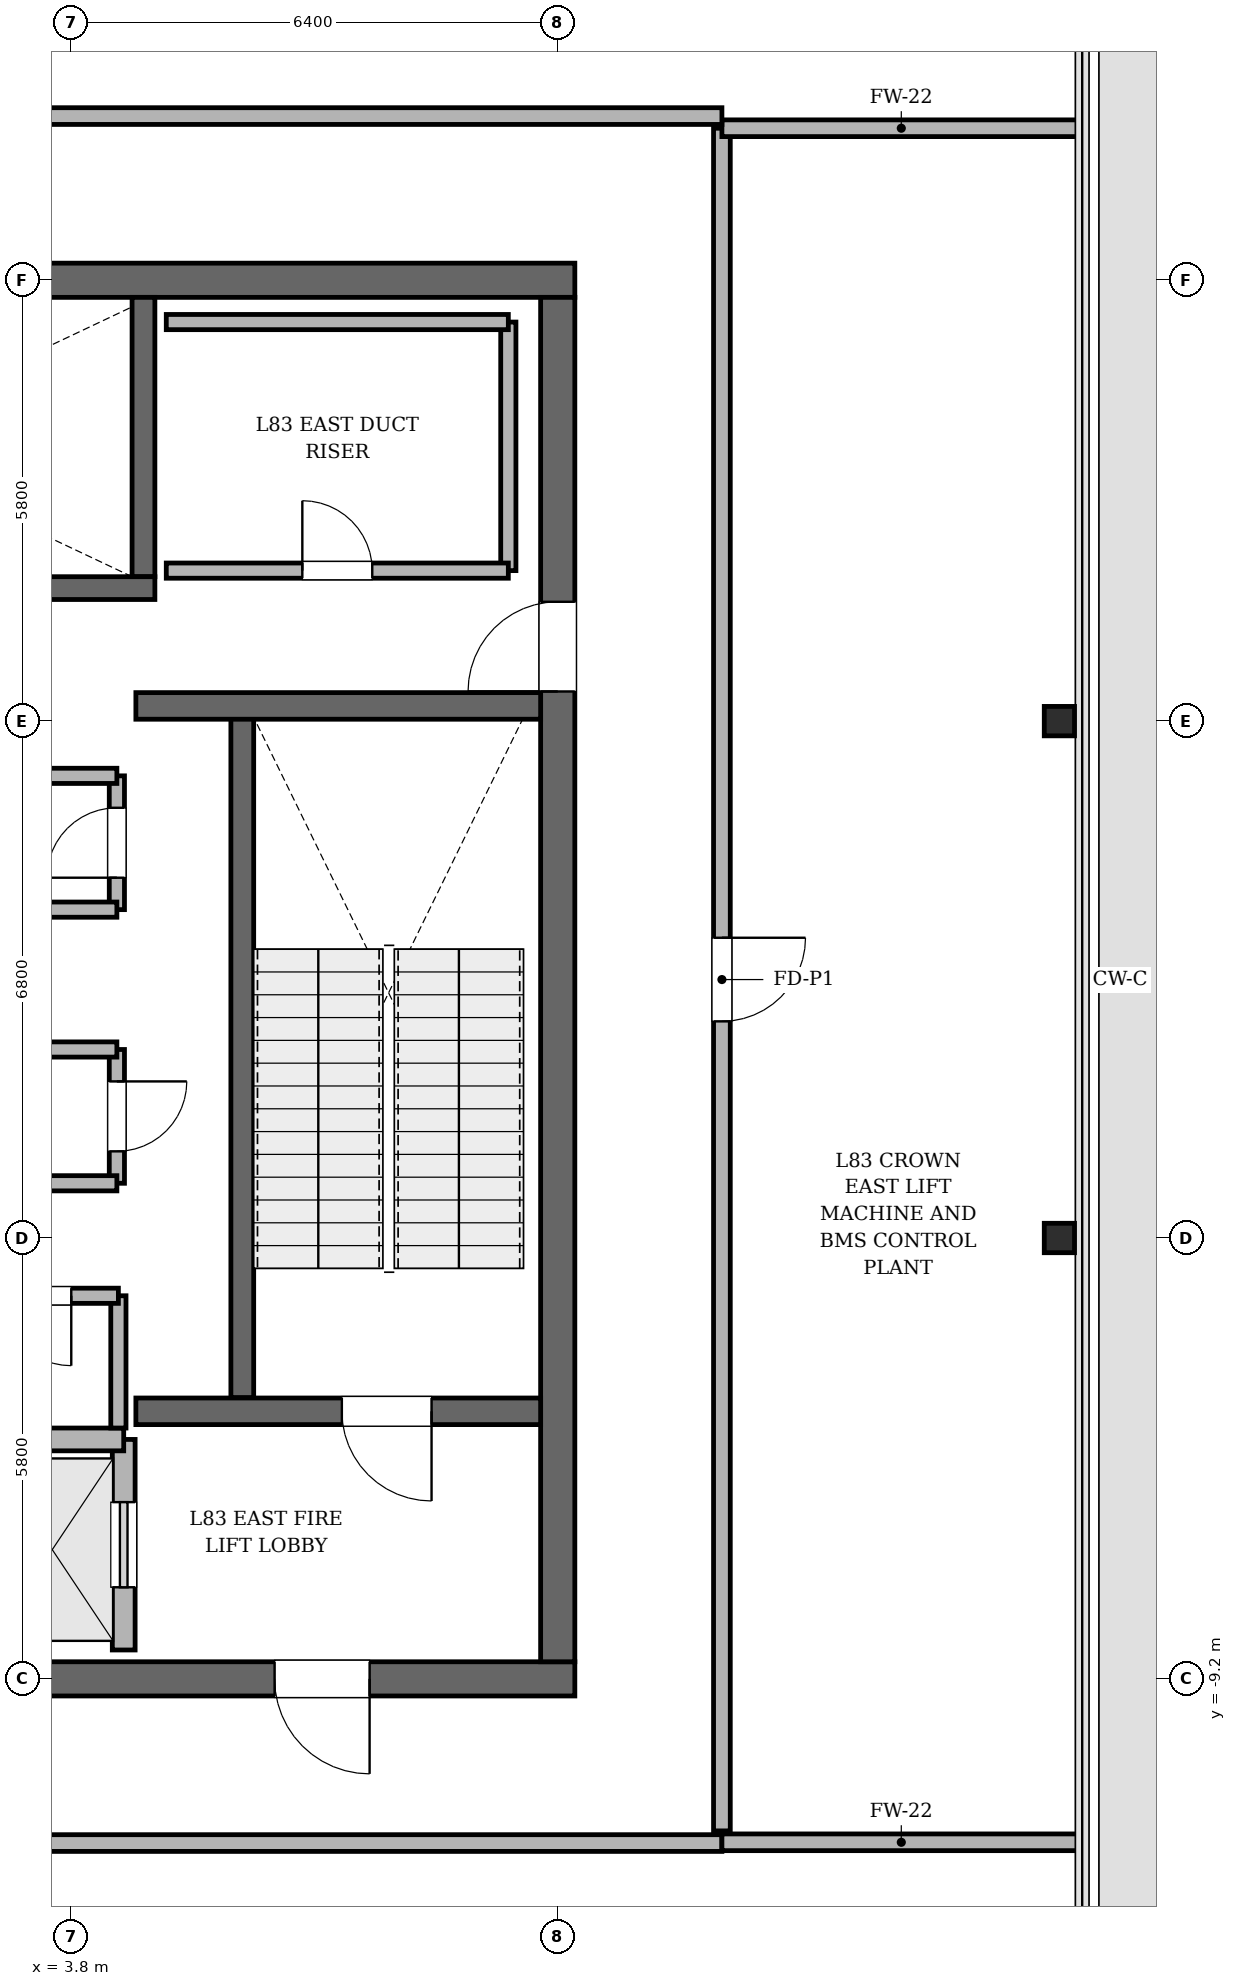
"""IFC4 building model, lengths in metres.
Left out: names, types, materials, properties, quantities, classifications, styles, units other than length and angle.
Written with IfcOpenShell. Run it as: python <this file> out.ifc"""

import sys

from ifc_helpers import new_model, si_unit, direction, frame, frame_2d, origin, origin_2d, place, context, subcontext, project, spatial, rectangle, i_section, extrude, element, fill, save


model = new_model("IFC4")
c1 = context("Model", 3, precision=1e-05, world=origin(), true_north=direction((0.0, 1.0)))
c2 = subcontext(c1, "Body", "Model", "MODEL_VIEW")
j1 = project(units=[si_unit("LENGTHUNIT", "METRE"), si_unit("PLANEANGLEUNIT", "RADIAN")], contexts=[c1])
p1 = place(None, origin())
s1 = spatial("IfcSite", under=j1, at=p1, CompositionType="ELEMENT")
p2 = place(p1, origin())
s2 = spatial("IfcBuilding", under=s1, at=p2, CompositionType="ELEMENT")
p3 = place(p2, frame((0.0, 0.0, 352.8)))
s3 = spatial("IfcBuildingStorey", under=s2, at=p3, CompositionType="ELEMENT", Elevation=352.8)
p4 = place(p3, frame((10.425, -9.2, 0.0), z_axis=(0.0, 0.0, 1.0), x_axis=(-1.0, 0.0, 0.0)))
e1 = element("IfcWall", 1, at=p4, inside=s3, PredefinedType="SHEAR", context=c2, shape_type="SweptSolid", body=[
    extrude(rectangle(XDim=20.85, YDim=0.45, at=frame_2d((10.425, 0.0))), origin(), (0.0, 0.0, 1.0), 4.5),
])
p5 = place(p4, frame((2.7, 0.0, 0.0)))
e2 = element("IfcOpeningElement", 2, at=p5, cuts=e1, PredefinedType="OPENING", context=c2, shape_type="SweptSolid", body=[
    extrude(rectangle(XDim=1.25, YDim=2.25, at=frame_2d((0.625, 1.125))), frame((0.0, 0.235, 0.0), z_axis=(0.0, -1.0, 0.0), x_axis=(1.0, 0.0, 0.0)), (0.0, 0.0, 1.0), 0.47),
])
p6 = place(p4, frame((16.9, 0.0, 0.0)))
e3 = element("IfcOpeningElement", 3, at=p6, cuts=e1, PredefinedType="OPENING", context=c2, shape_type="SweptSolid", body=[
    extrude(rectangle(XDim=1.25, YDim=2.25, at=frame_2d((0.625, 1.125))), frame((0.0, 0.235, 0.0), z_axis=(0.0, -1.0, 0.0), x_axis=(1.0, 0.0, 0.0)), (0.0, 0.0, 1.0), 0.47),
])
p7 = place(p3, frame((-10.425, 9.2, 0.0), z_axis=(0.0, 0.0, 1.0), x_axis=(1.0, 0.0, 0.0)))
e4 = element("IfcWall", 4, at=p7, inside=s3, PredefinedType="SHEAR", context=c2, shape_type="SweptSolid", body=[
    extrude(rectangle(XDim=20.85, YDim=0.45, at=frame_2d((10.425, 0.0))), origin(), (0.0, 0.0, 1.0), 4.5),
])
p8 = place(p3, frame((10.2, 8.975, 0.0), z_axis=(0.0, 0.0, 1.0), x_axis=(0.0, -1.0, 0.0)))
e5 = element("IfcWall", 5, at=p8, inside=s3, PredefinedType="SHEAR", context=c2, shape_type="SweptSolid", body=[
    extrude(rectangle(XDim=17.95, YDim=0.45, at=frame_2d((8.975, 0.0))), origin(), (0.0, 0.0, 1.0), 4.5),
])
p9 = place(p8, frame((4.005, 0.0, 0.0)))
e6 = element("IfcOpeningElement", 6, at=p9, cuts=e5, PredefinedType="OPENING", context=c2, shape_type="SweptSolid", body=[
    extrude(rectangle(XDim=1.18, YDim=2.2, at=frame_2d((0.59, 1.1))), frame((0.0, 0.235, 0.0), z_axis=(0.0, -1.0, 0.0), x_axis=(1.0, 0.0, 0.0)), (0.0, 0.0, 1.0), 0.47),
])
p10 = place(p3, frame((6.05, 3.45, 0.0), z_axis=(0.0, 0.0, 1.0), x_axis=(0.0, -1.0, 0.0)))
e7 = element("IfcWall", 7, at=p10, inside=s3, PredefinedType="SOLIDWALL", context=c2, shape_type="SweptSolid", body=[
    extrude(rectangle(XDim=8.95, YDim=0.3, at=frame_2d((4.475, 0.0))), origin(), (0.0, 0.0, 1.0), 4.5),
])
p11 = place(p3, frame((4.75, 8.975, 0.0), z_axis=(0.0, 0.0, 1.0), x_axis=(0.0, -1.0, 0.0)))
e8 = element("IfcWall", 8, at=p11, inside=s3, PredefinedType="SOLIDWALL", context=c2, shape_type="SweptSolid", body=[
    extrude(rectangle(XDim=3.675, YDim=0.3, at=frame_2d((1.837, 0.0))), origin(), (0.0, 0.0, 1.0), 4.5),
])
p12 = place(p3, frame((-4.9, 5.15, 0.0), z_axis=(0.0, 0.0, 1.0), x_axis=(1.0, 0.0, 0.0)))
e9 = element("IfcWall", 9, at=p12, inside=s3, PredefinedType="SOLIDWALL", context=c2, shape_type="SweptSolid", body=[
    extrude(rectangle(XDim=9.8, YDim=0.3, at=frame_2d((4.9, 0.0))), origin(), (0.0, 0.0, 1.0), 4.5),
])
p13 = place(p12, frame((0.56, 0.0, 0.0)))
e10 = element("IfcOpeningElement", 10, at=p13, cuts=e9, PredefinedType="OPENING", context=c2, shape_type="SweptSolid", body=[
    extrude(rectangle(XDim=1.18, YDim=2.2, at=frame_2d((0.59, 1.1))), frame((0.0, 0.16, 0.0), z_axis=(0.0, -1.0, 0.0), x_axis=(1.0, 0.0, 0.0)), (0.0, 0.0, 1.0), 0.32),
])
p14 = place(p3, frame((4.65, -5.68, 0.0), z_axis=(0.0, 0.0, 1.0), x_axis=(1.0, 0.0, 0.0)))
e11 = element("IfcWall", 11, at=p14, inside=s3, PredefinedType="SOLIDWALL", context=c2, shape_type="SweptSolid", body=[
    extrude(rectangle(XDim=5.325, YDim=0.35, at=frame_2d((2.663, 0.0))), origin(), (0.0, 0.0, 1.0), 4.5),
])
p15 = place(p14, frame((2.71, 0.0, 0.0)))
e12 = element("IfcOpeningElement", 12, at=p15, cuts=e11, PredefinedType="OPENING", context=c2, shape_type="SweptSolid", body=[
    extrude(rectangle(XDim=1.18, YDim=2.2, at=frame_2d((0.59, 1.1))), frame((0.0, 0.185, 0.0), z_axis=(0.0, -1.0, 0.0), x_axis=(1.0, 0.0, 0.0)), (0.0, 0.0, 1.0), 0.37),
])
p16 = place(p3, frame((4.65, 3.6, 0.0), z_axis=(0.0, 0.0, 1.0), x_axis=(1.0, 0.0, 0.0)))
e13 = element("IfcWall", 13, at=p16, inside=s3, PredefinedType="SOLIDWALL", context=c2, shape_type="SweptSolid", body=[
    extrude(rectangle(XDim=5.325, YDim=0.35, at=frame_2d((2.663, 0.0))), origin(), (0.0, 0.0, 1.0), 4.5),
])
for number, where, z_axis, x_axis in (
    (14, (16.8, -3.4, 0.0), (0.0, 0.0, 1.0), (1.0, 0.0, 0.0)),
    (15, (16.8, 3.4, 0.0), (0.0, 0.0, 1.0), (1.0, 0.0, 0.0)),
):
    element("IfcColumn", number, at=place(p3, frame(where, z_axis=z_axis, x_axis=x_axis)), inside=s3, PredefinedType="COLUMN", context=c2, shape_type="SweptSolid", body=[
        extrude(i_section(OverallWidth=0.398, OverallDepth=0.387, WebThickness=0.021, FlangeThickness=0.033, FilletRadius=0.018, at=origin_2d()), origin(), (0.0, 0.0, 1.0), 4.498),
    ])
p17 = place(p3, frame((4.49, -8.82, 0.0), z_axis=(0.0, 0.0, 1.0), x_axis=(0.0, 1.0, 0.0)))
e16 = element("IfcWall", 16, at=p17, inside=s3, PredefinedType="SOLIDWALL", context=c2, shape_type="SweptSolid", body=[
    extrude(rectangle(XDim=2.77, YDim=0.3, at=frame_2d((1.385, 0.0))), origin(), (0.0, 0.0, 1.0), 4.28),
])
p18 = place(p17, frame((0.825, 0.0, 0.0)))
e17 = element("IfcOpeningElement", 17, at=p18, cuts=e16, PredefinedType="OPENING", context=c2, shape_type="SweptSolid", body=[
    extrude(rectangle(XDim=1.12, YDim=2.25, at=frame_2d((0.56, 1.125))), frame((0.0, 0.16, 0.0), z_axis=(0.0, -1.0, 0.0), x_axis=(1.0, 0.0, 0.0)), (0.0, 0.0, 1.0), 0.32),
])
p19 = place(p3, frame((2.61, -6.05, 0.0), z_axis=(0.0, 0.0, 1.0), x_axis=(1.0, 0.0, 0.0)))
e18 = element("IfcWall", 18, at=p19, inside=s3, PredefinedType="SOLIDWALL", context=c2, shape_type="SweptSolid", body=[
    extrude(rectangle(XDim=1.88, YDim=0.3, at=frame_2d((0.94, 0.0))), origin(), (0.0, 0.0, 1.0), 4.28),
])
p20 = place(p3, frame((4.42, -5.9, 0.0), z_axis=(0.0, 0.0, 1.0), x_axis=(0.0, 1.0, 0.0)))
e19 = element("IfcWall", 19, at=p20, inside=s3, PredefinedType="SOLIDWALL", context=c2, shape_type="SweptSolid", body=[
    extrude(rectangle(XDim=1.74, YDim=0.2, at=frame_2d((0.87, 0.0))), origin(), (0.0, 0.0, 1.0), 4.28),
])
p21 = place(p3, frame((4.42, -4.16, 0.0), z_axis=(0.0, 0.0, 1.0), x_axis=(-1.0, 0.0, 0.0)))
e20 = element("IfcWall", 20, at=p21, inside=s3, PredefinedType="SOLIDWALL", context=c2, shape_type="SweptSolid", body=[
    extrude(rectangle(XDim=2.16, YDim=0.2, at=frame_2d((1.08, 0.0))), origin(), (0.0, 0.0, 1.0), 4.28),
])
p22 = place(p21, frame((0.62, 0.0, 0.0)))
e21 = element("IfcOpeningElement", 21, at=p22, cuts=e20, PredefinedType="OPENING", context=c2, shape_type="SweptSolid", body=[
    extrude(rectangle(XDim=0.92, YDim=2.1, at=frame_2d((0.46, 1.05))), frame((0.0, 0.11, 0.0), z_axis=(0.0, -1.0, 0.0), x_axis=(1.0, 0.0, 0.0)), (0.0, 0.0, 1.0), 0.22),
])
p23 = place(p3, frame((4.4, -2.68, 0.0), z_axis=(0.0, 0.0, 1.0), x_axis=(0.0, 1.0, 0.0)))
e22 = element("IfcWall", 22, at=p23, inside=s3, PredefinedType="SOLIDWALL", context=c2, shape_type="SweptSolid", body=[
    extrude(rectangle(XDim=1.76, YDim=0.2, at=frame_2d((0.88, 0.0))), origin(), (0.0, 0.0, 1.0), 4.28),
])
p24 = place(p23, frame((0.42, 0.0, 0.0)))
e23 = element("IfcOpeningElement", 23, at=p24, cuts=e22, PredefinedType="OPENING", context=c2, shape_type="SweptSolid", body=[
    extrude(rectangle(XDim=0.92, YDim=2.1, at=frame_2d((0.46, 1.05))), frame((0.0, 0.11, 0.0), z_axis=(0.0, -1.0, 0.0), x_axis=(1.0, 0.0, 0.0)), (0.0, 0.0, 1.0), 0.22),
])
for number, where, z_axis, x_axis in (
    (24, (4.4, -0.92, 0.0), (0.0, 0.0, 1.0), (-1.0, 0.0, 0.0)),
    (25, (-4.4, -2.68, 0.0), (0.0, 0.0, 1.0), (1.0, 0.0, 0.0)),
):
    element("IfcWall", number, at=place(p3, frame(where, z_axis=z_axis, x_axis=x_axis)), inside=s3, PredefinedType="SOLIDWALL", context=c2, shape_type="SweptSolid", body=[
        extrude(rectangle(XDim=8.8, YDim=0.2, at=frame_2d((4.4, 0.0))), origin(), (0.0, 0.0, 1.0), 4.28),
    ])
p25 = place(p3, frame((4.4, 0.92, 0.0), z_axis=(0.0, 0.0, 1.0), x_axis=(0.0, 1.0, 0.0)))
e26 = element("IfcWall", 26, at=p25, inside=s3, PredefinedType="SOLIDWALL", context=c2, shape_type="SweptSolid", body=[
    extrude(rectangle(XDim=1.76, YDim=0.2, at=frame_2d((0.88, 0.0))), origin(), (0.0, 0.0, 1.0), 4.28),
])
p26 = place(p25, frame((0.42, 0.0, 0.0)))
e27 = element("IfcOpeningElement", 27, at=p26, cuts=e26, PredefinedType="OPENING", context=c2, shape_type="SweptSolid", body=[
    extrude(rectangle(XDim=0.92, YDim=2.1, at=frame_2d((0.46, 1.05))), frame((0.0, 0.11, 0.0), z_axis=(0.0, -1.0, 0.0), x_axis=(1.0, 0.0, 0.0)), (0.0, 0.0, 1.0), 0.22),
])
for number, where, z_axis, x_axis in (
    (28, (4.4, 2.68, 0.0), (0.0, 0.0, 1.0), (-1.0, 0.0, 0.0)),
    (29, (-4.4, 0.92, 0.0), (0.0, 0.0, 1.0), (1.0, 0.0, 0.0)),
):
    element("IfcWall", number, at=place(p3, frame(where, z_axis=z_axis, x_axis=x_axis)), inside=s3, PredefinedType="SOLIDWALL", context=c2, shape_type="SweptSolid", body=[
        extrude(rectangle(XDim=8.8, YDim=0.2, at=frame_2d((4.4, 0.0))), origin(), (0.0, 0.0, 1.0), 4.28),
    ])
p27 = place(p3, frame((9.55, 5.38, 0.0), z_axis=(0.0, 0.0, 1.0), x_axis=(0.0, 1.0, 0.0)))
e30 = element("IfcWall", 30, at=p27, inside=s3, PredefinedType="SOLIDWALL", context=c2, shape_type="SweptSolid", body=[
    extrude(rectangle(XDim=3.27, YDim=0.2, at=frame_2d((1.635, 0.0))), origin(), (0.0, 0.0, 1.0), 4.28),
])
p28 = place(p3, frame((9.55, 8.65, 0.0), z_axis=(0.0, 0.0, 1.0), x_axis=(-1.0, 0.0, 0.0)))
e31 = element("IfcWall", 31, at=p28, inside=s3, PredefinedType="SOLIDWALL", context=c2, shape_type="SweptSolid", body=[
    extrude(rectangle(XDim=4.5, YDim=0.2, at=frame_2d((2.25, 0.0))), origin(), (0.0, 0.0, 1.0), 4.28),
])
p29 = place(p3, frame((5.05, 5.38, 0.0), z_axis=(0.0, 0.0, 1.0), x_axis=(1.0, 0.0, 0.0)))
e32 = element("IfcWall", 32, at=p29, inside=s3, PredefinedType="SOLIDWALL", context=c2, shape_type="SweptSolid", body=[
    extrude(rectangle(XDim=4.5, YDim=0.2, at=frame_2d((2.25, 0.0))), origin(), (0.0, 0.0, 1.0), 4.28),
])
p30 = place(p29, frame((1.79, 0.0, 0.0)))
e33 = element("IfcOpeningElement", 33, at=p30, cuts=e32, PredefinedType="OPENING", context=c2, shape_type="SweptSolid", body=[
    extrude(rectangle(XDim=0.92, YDim=2.1, at=frame_2d((0.46, 1.05))), frame((0.0, 0.11, 0.0), z_axis=(0.0, -1.0, 0.0), x_axis=(1.0, 0.0, 0.0)), (0.0, 0.0, 1.0), 0.22),
])
p31 = place(p3, frame((-12.36, -11.36, 0.0), z_axis=(0.0, 0.0, 1.0), x_axis=(1.0, 0.0, 0.0)))
e34 = element("IfcWall", 34, at=p31, inside=s3, PredefinedType="SOLIDWALL", context=c2, shape_type="SweptSolid", body=[
    extrude(rectangle(XDim=24.72, YDim=0.22, at=frame_2d((12.36, 0.0))), origin(), (0.0, 0.0, 1.0), 2.994),
])
p32 = place(p31, frame((11.81, 0.0, 0.0)))
e35 = element("IfcOpeningElement", 35, at=p32, cuts=e34, PredefinedType="OPENING", context=c2, shape_type="SweptSolid", body=[
    extrude(rectangle(XDim=1.1, YDim=2.2, at=frame_2d((0.55, 1.1))), frame((0.0, 0.12, 0.0), z_axis=(0.0, -1.0, 0.0), x_axis=(1.0, 0.0, 0.0)), (0.0, 0.0, 1.0), 0.24),
])
p33 = place(p3, frame((12.36, -11.35, 0.0), z_axis=(0.0, 0.0, 1.0), x_axis=(1.0, 0.0, 0.0)))
e36 = element("IfcWall", 36, at=p33, inside=s3, PredefinedType="SOLIDWALL", context=c2, shape_type="SweptSolid", body=[
    extrude(rectangle(XDim=4.72, YDim=0.22, at=frame_2d((2.36, 0.0))), origin(), (0.0, 0.0, 1.0), 2.994),
])
p34 = place(p3, frame((12.36, -11.2, 0.0), z_axis=(0.0, 0.0, 1.0), x_axis=(0.0, 1.0, 0.0)))
e37 = element("IfcWall", 37, at=p34, inside=s3, PredefinedType="SOLIDWALL", context=c2, shape_type="SweptSolid", body=[
    extrude(rectangle(XDim=22.4, YDim=0.22, at=frame_2d((11.2, 0.0))), origin(), (0.0, 0.0, 1.0), 2.994),
])
p35 = place(p34, frame((10.65, 0.0, 0.0)))
e38 = element("IfcOpeningElement", 38, at=p35, cuts=e37, PredefinedType="OPENING", context=c2, shape_type="SweptSolid", body=[
    extrude(rectangle(XDim=1.1, YDim=2.2, at=frame_2d((0.55, 1.1))), frame((0.0, 0.12, 0.0), z_axis=(0.0, -1.0, 0.0), x_axis=(1.0, 0.0, 0.0)), (0.0, 0.0, 1.0), 0.24),
])
p36 = place(p3, frame((12.36, 11.2, 0.0), z_axis=(0.0, 0.0, 1.0), x_axis=(1.0, 0.0, 0.0)))
e39 = element("IfcWall", 39, at=p36, inside=s3, PredefinedType="SOLIDWALL", context=c2, shape_type="SweptSolid", body=[
    extrude(rectangle(XDim=4.72, YDim=0.22, at=frame_2d((2.36, 0.0))), origin(), (0.0, 0.0, 1.0), 2.994),
])
p37 = place(p3, frame((12.36, 11.36, 0.0), z_axis=(0.0, 0.0, 1.0), x_axis=(-1.0, 0.0, 0.0)))
e40 = element("IfcWall", 40, at=p37, inside=s3, PredefinedType="SOLIDWALL", context=c2, shape_type="SweptSolid", body=[
    extrude(rectangle(XDim=24.72, YDim=0.22, at=frame_2d((12.36, 0.0))), origin(), (0.0, 0.0, 1.0), 2.994),
])
p38 = place(p37, frame((11.81, 0.0, 0.0)))
e41 = element("IfcOpeningElement", 41, at=p38, cuts=e40, PredefinedType="OPENING", context=c2, shape_type="SweptSolid", body=[
    extrude(rectangle(XDim=1.1, YDim=2.2, at=frame_2d((0.55, 1.1))), frame((0.0, 0.12, 0.0), z_axis=(0.0, -1.0, 0.0), x_axis=(1.0, 0.0, 0.0)), (0.0, 0.0, 1.0), 0.24),
])
p39 = place(p15, origin())
e42 = element("IfcDoor", 42, at=p39, inside=s3, OperationType="SINGLE_SWING_RIGHT", PredefinedType="DOOR", context=c2, shape_type="SweptSolid", body=[
    extrude(rectangle(XDim=1.18, YDim=2.2, at=frame_2d((0.59, 1.1))), frame((0.0, 0.025, 0.0), z_axis=(0.0, -1.0, 0.0), x_axis=(1.0, 0.0, 0.0)), (0.0, 0.0, 1.0), 0.05),
])
fill(e12, e42)
p40 = place(p5, origin())
e43 = element("IfcDoor", 43, at=p40, inside=s3, OperationType="SINGLE_SWING_LEFT", PredefinedType="DOOR", context=c2, shape_type="SweptSolid", body=[
    extrude(rectangle(XDim=1.25, YDim=2.25, at=frame_2d((0.625, 1.125))), frame((0.0, 0.025, 0.0), z_axis=(0.0, -1.0, 0.0), x_axis=(1.0, 0.0, 0.0)), (0.0, 0.0, 1.0), 0.05),
])
fill(e2, e43)
p41 = place(p9, origin())
e44 = element("IfcDoor", 44, at=p41, inside=s3, OperationType="SINGLE_SWING_RIGHT", PredefinedType="DOOR", context=c2, shape_type="SweptSolid", body=[
    extrude(rectangle(XDim=1.18, YDim=2.2, at=frame_2d((0.59, 1.1))), frame((0.0, 0.025, 0.0), z_axis=(0.0, -1.0, 0.0), x_axis=(1.0, 0.0, 0.0)), (0.0, 0.0, 1.0), 0.05),
])
fill(e6, e44)
p42 = place(p18, origin())
e45 = element("IfcDoor", 45, at=p42, inside=s3, OperationType="SLIDING_TO_RIGHT", PredefinedType="DOOR", context=c2, shape_type="SweptSolid", body=[
    extrude(rectangle(XDim=1.12, YDim=2.25, at=frame_2d((0.56, 1.125))), frame((0.0, 0.025, 0.0), z_axis=(0.0, -1.0, 0.0), x_axis=(1.0, 0.0, 0.0)), (0.0, 0.0, 1.0), 0.05),
])
fill(e17, e45)
p43 = place(p22, origin())
e46 = element("IfcDoor", 46, at=p43, inside=s3, OperationType="SINGLE_SWING_LEFT", PredefinedType="DOOR", context=c2, shape_type="SweptSolid", body=[
    extrude(rectangle(XDim=0.92, YDim=2.1, at=frame_2d((0.46, 1.05))), frame((0.0, 0.025, 0.0), z_axis=(0.0, -1.0, 0.0), x_axis=(1.0, 0.0, 0.0)), (0.0, 0.0, 1.0), 0.05),
])
fill(e21, e46)
p44 = place(p24, origin())
e47 = element("IfcDoor", 47, at=p44, inside=s3, OperationType="SINGLE_SWING_RIGHT", PredefinedType="DOOR", context=c2, shape_type="SweptSolid", body=[
    extrude(rectangle(XDim=0.92, YDim=2.1, at=frame_2d((0.46, 1.05))), frame((0.0, 0.025, 0.0), z_axis=(0.0, -1.0, 0.0), x_axis=(1.0, 0.0, 0.0)), (0.0, 0.0, 1.0), 0.05),
])
fill(e23, e47)
p45 = place(p26, origin())
e48 = element("IfcDoor", 48, at=p45, inside=s3, OperationType="SINGLE_SWING_LEFT", PredefinedType="DOOR", context=c2, shape_type="SweptSolid", body=[
    extrude(rectangle(XDim=0.92, YDim=2.1, at=frame_2d((0.46, 1.05))), frame((0.0, 0.025, 0.0), z_axis=(0.0, -1.0, 0.0), x_axis=(1.0, 0.0, 0.0)), (0.0, 0.0, 1.0), 0.05),
])
fill(e27, e48)
p46 = place(p30, origin())
e49 = element("IfcDoor", 49, at=p46, inside=s3, OperationType="SINGLE_SWING_LEFT", PredefinedType="DOOR", context=c2, shape_type="SweptSolid", body=[
    extrude(rectangle(XDim=0.92, YDim=2.1, at=frame_2d((0.46, 1.05))), frame((0.0, 0.025, 0.0), z_axis=(0.0, -1.0, 0.0), x_axis=(1.0, 0.0, 0.0)), (0.0, 0.0, 1.0), 0.05),
])
fill(e33, e49)
p47 = place(p35, origin())
e50 = element("IfcDoor", 50, at=p47, inside=s3, OperationType="SINGLE_SWING_RIGHT", PredefinedType="DOOR", context=c2, shape_type="SweptSolid", body=[
    extrude(rectangle(XDim=1.1, YDim=2.2, at=frame_2d((0.55, 1.1))), frame((0.0, 0.025, 0.0), z_axis=(0.0, -1.0, 0.0), x_axis=(1.0, 0.0, 0.0)), (0.0, 0.0, 1.0), 0.05),
])
fill(e38, e50)
save(model, sys.argv[1])
